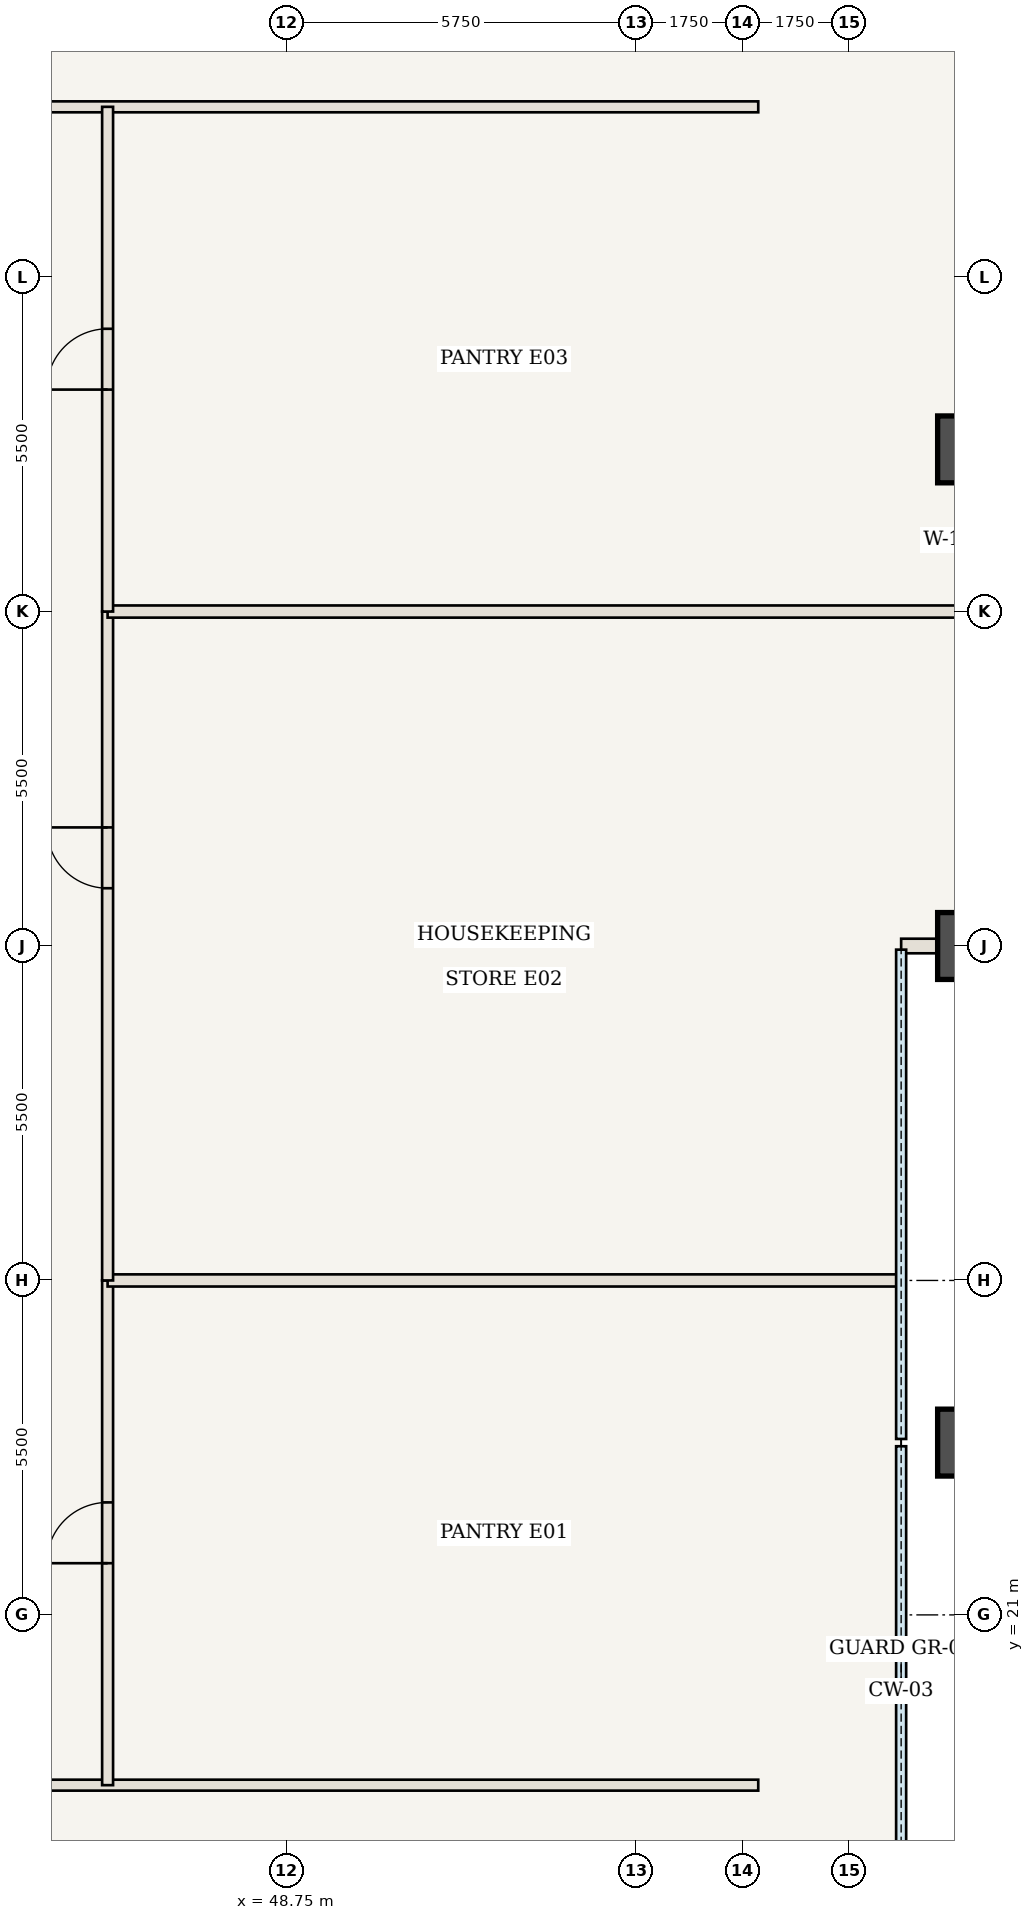
"""IFC4 building model, lengths in metres.
Left out: names, types, materials, properties, quantities, classifications, styles, units other than length and angle.
Written with IfcOpenShell. Run it as: python <this file> out.ifc"""

import sys

from ifc_helpers import new_model, si_unit, direction, frame, frame_2d, origin, origin_2d, place, context, subcontext, project, spatial, rectangle, extrude, element, fill, save


model = new_model("IFC4")
c1 = context("Model", 3, precision=1e-05, world=origin(), true_north=direction((0.0, 1.0)))
c2 = subcontext(c1, "Body", "Model", "MODEL_VIEW")
j1 = project(units=[si_unit("LENGTHUNIT", "METRE"), si_unit("PLANEANGLEUNIT", "RADIAN")], contexts=[c1])
p1 = place(None, origin())
s1 = spatial("IfcSite", under=j1, at=p1, CompositionType="ELEMENT")
p2 = place(p1, origin())
s2 = spatial("IfcBuilding", under=s1, at=p2, CompositionType="ELEMENT")
p3 = place(p2, frame((0.0, 0.0, 89.25)))
s3 = spatial("IfcBuildingStorey", under=s2, at=p3, CompositionType="ELEMENT", Elevation=89.25)
for number, where, z_axis, x_axis in (
    (1, (60.0, 23.833, 0.0), (0.0, 0.0, 1.0), (1.0, 0.0, 0.0)),
    (2, (60.0, 32.0, 0.0), (0.0, 0.0, 1.0), (1.0, 0.0, 0.0)),
    (3, (60.0, 40.167, 0.0), (0.0, 0.0, 1.0), (1.0, 0.0, 0.0)),
):
    element("IfcColumn", number, at=place(p3, frame(where, z_axis=z_axis, x_axis=x_axis)), inside=s3, PredefinedType="COLUMN", context=c2, shape_type="SweptSolid", body=[
        extrude(rectangle(XDim=1.1, YDim=1.1, at=origin_2d()), origin(), (0.0, 0.0, 1.0), 3.5),
    ])
p4 = place(p3, frame((33.8, 18.2, 0.0), z_axis=(0.0, 0.0, 1.0), x_axis=(1.0, 0.0, 0.0)))
e4 = element("IfcWall", 4, at=p4, inside=s3, PredefinedType="STANDARD", context=c2, shape_type="SweptSolid", body=[
    extrude(rectangle(XDim=22.7, YDim=0.18, at=frame_2d((11.35, 0.0))), origin(), (0.0, 0.0, 1.0), 3.32),
])
p5 = place(p4, frame((5.475, 0.0, 0.0)))
e5 = element("IfcOpeningElement", 5, at=p5, cuts=e4, PredefinedType="OPENING", context=c2, shape_type="SweptSolid", body=[
    extrude(rectangle(XDim=1.0, YDim=2.15, at=frame_2d((0.5, 1.075))), frame((0.0, 0.1, 0.0), z_axis=(0.0, -1.0, 0.0), x_axis=(1.0, 0.0, 0.0)), (0.0, 0.0, 1.0), 0.2),
])
p6 = place(p3, frame((38.5, 45.8, 0.0), z_axis=(0.0, 0.0, 1.0), x_axis=(1.0, 0.0, 0.0)))
e6 = element("IfcWall", 6, at=p6, inside=s3, PredefinedType="STANDARD", context=c2, shape_type="SweptSolid", body=[
    extrude(rectangle(XDim=18.0, YDim=0.18, at=frame_2d((9.0, 0.0))), origin(), (0.0, 0.0, 1.0), 3.32),
])
p7 = place(p6, frame((4.575, 0.0, 0.0)))
e7 = element("IfcOpeningElement", 7, at=p7, cuts=e6, PredefinedType="OPENING", context=c2, shape_type="SweptSolid", body=[
    extrude(rectangle(XDim=1.0, YDim=2.15, at=frame_2d((0.5, 1.075))), frame((0.0, 0.1, 0.0), z_axis=(0.0, -1.0, 0.0), x_axis=(1.0, 0.0, 0.0)), (0.0, 0.0, 1.0), 0.2),
])
p8 = place(p3, frame((45.8, 18.2, 0.0), z_axis=(0.0, 0.0, 1.0), x_axis=(0.0, 1.0, 0.0)))
e8 = element("IfcWall", 8, at=p8, inside=s3, PredefinedType="STANDARD", context=c2, shape_type="SweptSolid", body=[
    extrude(rectangle(XDim=8.3, YDim=0.18, at=frame_2d((4.15, 0.0))), origin(), (0.0, 0.0, 1.0), 3.32),
])
p9 = place(p8, frame((3.65, 0.0, 0.0)))
e9 = element("IfcOpeningElement", 9, at=p9, cuts=e8, PredefinedType="OPENING", context=c2, shape_type="SweptSolid", body=[
    extrude(rectangle(XDim=1.0, YDim=2.15, at=frame_2d((0.5, 1.075))), frame((0.0, 0.1, 0.0), z_axis=(0.0, -1.0, 0.0), x_axis=(1.0, 0.0, 0.0)), (0.0, 0.0, 1.0), 0.2),
])
p10 = place(p3, frame((45.8, 26.5, 0.0), z_axis=(0.0, 0.0, 1.0), x_axis=(1.0, 0.0, 0.0)))
e10 = element("IfcWall", 10, at=p10, inside=s3, PredefinedType="STANDARD", context=c2, shape_type="SweptSolid", body=[
    extrude(rectangle(XDim=13.04, YDim=0.2, at=frame_2d((6.52, 0.0))), origin(), (0.0, 0.0, 1.0), 3.32),
])
p11 = place(p3, frame((45.8, 26.5, 0.0), z_axis=(0.0, 0.0, 1.0), x_axis=(0.0, 1.0, 0.0)))
e11 = element("IfcWall", 11, at=p11, inside=s3, PredefinedType="STANDARD", context=c2, shape_type="SweptSolid", body=[
    extrude(rectangle(XDim=11.0, YDim=0.18, at=frame_2d((5.5, 0.0))), origin(), (0.0, 0.0, 1.0), 3.32),
])
p12 = place(p11, frame((6.45, 0.0, 0.0)))
e12 = element("IfcOpeningElement", 12, at=p12, cuts=e11, PredefinedType="OPENING", context=c2, shape_type="SweptSolid", body=[
    extrude(rectangle(XDim=1.0, YDim=2.15, at=frame_2d((0.5, 1.075))), frame((0.0, 0.1, 0.0), z_axis=(0.0, -1.0, 0.0), x_axis=(1.0, 0.0, 0.0)), (0.0, 0.0, 1.0), 0.2),
])
p13 = place(p3, frame((45.8, 37.5, 0.0), z_axis=(0.0, 0.0, 1.0), x_axis=(1.0, 0.0, 0.0)))
e13 = element("IfcWall", 13, at=p13, inside=s3, PredefinedType="STANDARD", context=c2, shape_type="SweptSolid", body=[
    extrude(rectangle(XDim=14.14, YDim=0.2, at=frame_2d((7.07, 0.0))), origin(), (0.0, 0.0, 1.0), 3.32),
])
p14 = place(p3, frame((45.8, 37.5, 0.0), z_axis=(0.0, 0.0, 1.0), x_axis=(0.0, 1.0, 0.0)))
e14 = element("IfcWall", 14, at=p14, inside=s3, PredefinedType="STANDARD", context=c2, shape_type="SweptSolid", body=[
    extrude(rectangle(XDim=8.3, YDim=0.18, at=frame_2d((4.15, 0.0))), origin(), (0.0, 0.0, 1.0), 3.32),
])
p15 = place(p14, frame((3.65, 0.0, 0.0)))
e15 = element("IfcOpeningElement", 15, at=p15, cuts=e14, PredefinedType="OPENING", context=c2, shape_type="SweptSolid", body=[
    extrude(rectangle(XDim=1.0, YDim=2.15, at=frame_2d((0.5, 1.075))), frame((0.0, 0.1, 0.0), z_axis=(0.0, -1.0, 0.0), x_axis=(1.0, 0.0, 0.0)), (0.0, 0.0, 1.0), 0.2),
])
p16 = place(p3, frame((60.0, 32.0, 0.0), z_axis=(0.0, 0.0, 1.0), x_axis=(-1.0, 0.0, 0.0)))
e16 = element("IfcWall", 16, at=p16, inside=s3, PredefinedType="USERDEFINED", context=c2, shape_type="SweptSolid", body=[
    extrude(rectangle(XDim=1.15, YDim=0.24, at=frame_2d((0.575, 0.0))), origin(), (0.0, 0.0, 1.0), 2.52),
])
p17 = place(p9, origin())
e17 = element("IfcDoor", 17, at=p17, inside=s3, OperationType="SINGLE_SWING_LEFT", PredefinedType="DOOR", context=c2, shape_type="SweptSolid", body=[
    extrude(rectangle(XDim=1.0, YDim=2.15, at=frame_2d((0.5, 1.075))), frame((0.0, 0.025, 0.0), z_axis=(0.0, -1.0, 0.0), x_axis=(1.0, 0.0, 0.0)), (0.0, 0.0, 1.0), 0.05),
])
fill(e9, e17)
p18 = place(p12, origin())
e18 = element("IfcDoor", 18, at=p18, inside=s3, OperationType="SINGLE_SWING_RIGHT", PredefinedType="DOOR", context=c2, shape_type="SweptSolid", body=[
    extrude(rectangle(XDim=1.0, YDim=2.15, at=frame_2d((0.5, 1.075))), frame((0.0, 0.025, 0.0), z_axis=(0.0, -1.0, 0.0), x_axis=(1.0, 0.0, 0.0)), (0.0, 0.0, 1.0), 0.05),
])
fill(e12, e18)
p19 = place(p15, origin())
e19 = element("IfcDoor", 19, at=p19, inside=s3, OperationType="SINGLE_SWING_LEFT", PredefinedType="DOOR", context=c2, shape_type="SweptSolid", body=[
    extrude(rectangle(XDim=1.0, YDim=2.15, at=frame_2d((0.5, 1.075))), frame((0.0, 0.025, 0.0), z_axis=(0.0, -1.0, 0.0), x_axis=(1.0, 0.0, 0.0)), (0.0, 0.0, 1.0), 0.05),
])
fill(e15, e19)
save(model, sys.argv[1])
